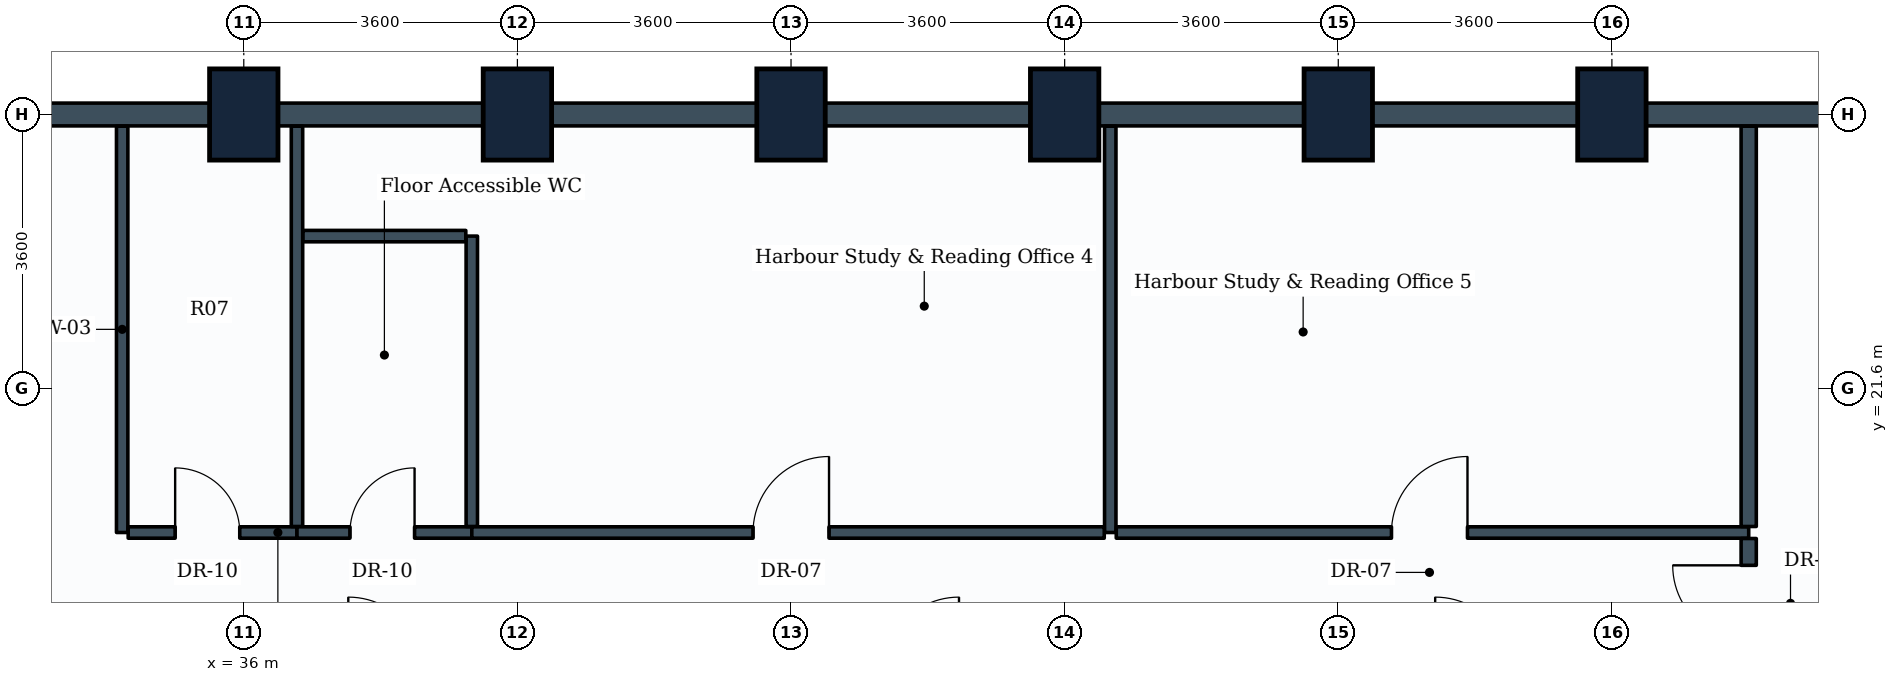
"""IFC4 building model, lengths in metres.
Left out: names, types, materials, properties, quantities, classifications, styles, units other than length and angle.
Written with IfcOpenShell. Run it as: python <this file> out.ifc"""

import sys

from ifc_helpers import new_model, si_unit, direction, frame, frame_2d, origin, origin_2d, place, context, subcontext, project, spatial, rectangle, extrude, element, fill, save


model = new_model("IFC4")
c1 = context("Model", 3, precision=1e-05, world=origin(), true_north=direction((0.0, 1.0)))
c2 = subcontext(c1, "Body", "Model", "MODEL_VIEW")
j1 = project(units=[si_unit("LENGTHUNIT", "METRE"), si_unit("PLANEANGLEUNIT", "RADIAN")], contexts=[c1])
p1 = place(None, origin())
s1 = spatial("IfcSite", under=j1, at=p1, CompositionType="ELEMENT")
p2 = place(p1, origin())
s2 = spatial("IfcBuilding", under=s1, at=p2, CompositionType="ELEMENT")
p3 = place(p2, frame((0.0, 0.0, 51.3)))
s3 = spatial("IfcBuildingStorey", under=s2, at=p3, CompositionType="ELEMENT", Elevation=51.3)
for number, where, z_axis, x_axis in (
    (1, (36.0, 25.2, 0.0), (0.0, 0.0, 1.0), (1.0, 0.0, 0.0)),
    (2, (39.6, 25.2, 0.0), (0.0, 0.0, 1.0), (1.0, 0.0, 0.0)),
    (3, (43.2, 25.2, 0.0), (0.0, 0.0, 1.0), (1.0, 0.0, 0.0)),
    (4, (46.8, 25.2, 0.0), (0.0, 0.0, 1.0), (1.0, 0.0, 0.0)),
    (5, (50.4, 25.2, 0.0), (0.0, 0.0, 1.0), (1.0, 0.0, 0.0)),
    (6, (54.0, 25.2, 0.0), (0.0, 0.0, 1.0), (1.0, 0.0, 0.0)),
):
    element("IfcColumn", number, at=place(p3, frame(where, z_axis=z_axis, x_axis=x_axis)), inside=s3, PredefinedType="COLUMN", context=c2, shape_type="SweptSolid", body=[
        extrude(rectangle(XDim=0.9, YDim=1.2, at=origin_2d()), origin(), (0.0, 0.0, 1.0), 3.9),
    ])
for number, where, z_axis, x_axis in (
    (7, (54.0, 25.2, 0.0), (0.0, 0.0, 1.0), (1.0, 0.0, 0.0)),
    (8, (50.4, 25.2, 0.0), (0.0, 0.0, 1.0), (1.0, 0.0, 0.0)),
):
    element("IfcWall", number, at=place(p3, frame(where, z_axis=z_axis, x_axis=x_axis)), inside=s3, PredefinedType="STANDARD", context=c2, shape_type="SweptSolid", body=[
        extrude(rectangle(XDim=3.6, YDim=0.3, at=frame_2d((1.8, 0.0))), origin(), (0.0, 0.0, 1.0), 2.93),
    ])
p4 = place(p3, frame((46.8, 25.2, 0.0), z_axis=(0.0, 0.0, 1.0), x_axis=(1.0, 0.0, 0.0)))
e9 = element("IfcWall", 9, at=p4, inside=s3, PredefinedType="STANDARD", context=c2, shape_type="SweptSolid", body=[
    extrude(rectangle(XDim=3.6, YDim=0.3, at=frame_2d((1.8, 0.0))), origin(), (0.0, 0.0, 1.0), 2.93),
])
p5 = place(p3, frame((43.2, 25.2, 0.0), z_axis=(0.0, 0.0, 1.0), x_axis=(1.0, 0.0, 0.0)))
e10 = element("IfcWall", 10, at=p5, inside=s3, PredefinedType="STANDARD", context=c2, shape_type="SweptSolid", body=[
    extrude(rectangle(XDim=3.6, YDim=0.3, at=frame_2d((1.8, 0.0))), origin(), (0.0, 0.0, 1.0), 2.93),
])
p6 = place(p3, frame((39.6, 25.2, 0.0), z_axis=(0.0, 0.0, 1.0), x_axis=(1.0, 0.0, 0.0)))
e11 = element("IfcWall", 11, at=p6, inside=s3, PredefinedType="STANDARD", context=c2, shape_type="SweptSolid", body=[
    extrude(rectangle(XDim=3.6, YDim=0.3, at=frame_2d((1.8, 0.0))), origin(), (0.0, 0.0, 1.0), 2.93),
])
for number, where, z_axis, x_axis in (
    (12, (36.0, 25.2, 0.0), (0.0, 0.0, 1.0), (1.0, 0.0, 0.0)),
    (13, (32.4, 25.2, 0.0), (0.0, 0.0, 1.0), (1.0, 0.0, 0.0)),
):
    element("IfcWall", number, at=place(p3, frame(where, z_axis=z_axis, x_axis=x_axis)), inside=s3, PredefinedType="STANDARD", context=c2, shape_type="SweptSolid", body=[
        extrude(rectangle(XDim=3.6, YDim=0.3, at=frame_2d((1.8, 0.0))), origin(), (0.0, 0.0, 1.0), 2.93),
    ])
p7 = place(p3, frame((34.4, 19.7, 0.0), z_axis=(0.0, 0.0, 1.0), x_axis=(0.0, 1.0, 0.0)))
e14 = element("IfcWall", 14, at=p7, inside=s3, PredefinedType="PARTITIONING", context=c2, shape_type="SweptSolid", body=[
    extrude(rectangle(XDim=5.346, YDim=0.15, at=frame_2d((2.673, 0.0))), origin(), (0.0, 0.0, 1.0), 2.93),
])
p8 = place(p3, frame((34.479, 19.7, 0.0), z_axis=(0.0, 0.0, 1.0), x_axis=(1.0, 0.0, 0.0)))
e15 = element("IfcWall", 15, at=p8, inside=s3, PredefinedType="PARTITIONING", context=c2, shape_type="SweptSolid", body=[
    extrude(rectangle(XDim=2.221, YDim=0.15, at=frame_2d((1.11, 0.0))), origin(), (0.0, 0.0, 1.0), 3.08),
])
p9 = place(p8, frame((0.618, 0.0, 0.0)))
e16 = element("IfcOpeningElement", 16, at=p9, cuts=e15, PredefinedType="OPENING", context=c2, shape_type="SweptSolid", body=[
    extrude(rectangle(XDim=0.85, YDim=2.1, at=frame_2d((0.425, 1.05))), frame((0.0, 0.085, 0.0), z_axis=(0.0, -1.0, 0.0), x_axis=(1.0, 0.0, 0.0)), (0.0, 0.0, 1.0), 0.17),
])
p10 = place(p3, frame((36.7, 19.779, 0.0), z_axis=(0.0, 0.0, 1.0), x_axis=(0.0, 1.0, 0.0)))
e17 = element("IfcWall", 17, at=p10, inside=s3, PredefinedType="PARTITIONING", context=c2, shape_type="SweptSolid", body=[
    extrude(rectangle(XDim=5.267, YDim=0.15, at=frame_2d((2.633, 0.0))), origin(), (0.0, 0.0, 1.0), 2.93),
])
p11 = place(p3, frame((36.7, 19.7, 0.0), z_axis=(0.0, 0.0, 1.0), x_axis=(1.0, 0.0, 0.0)))
e18 = element("IfcWall", 18, at=p11, inside=s3, PredefinedType="PARTITIONING", context=c2, shape_type="SweptSolid", body=[
    extrude(rectangle(XDim=2.3, YDim=0.15, at=frame_2d((1.15, 0.0))), origin(), (0.0, 0.0, 1.0), 3.635),
])
p12 = place(p11, frame((0.697, 0.0, 0.0)))
e19 = element("IfcOpeningElement", 19, at=p12, cuts=e18, PredefinedType="OPENING", context=c2, shape_type="SweptSolid", body=[
    extrude(rectangle(XDim=0.85, YDim=2.1, at=frame_2d((0.425, 1.05))), frame((0.0, 0.085, 0.0), z_axis=(0.0, -1.0, 0.0), x_axis=(1.0, 0.0, 0.0)), (0.0, 0.0, 1.0), 0.17),
])
p13 = place(p3, frame((39.0, 19.779, 0.0), z_axis=(0.0, 0.0, 1.0), x_axis=(0.0, 1.0, 0.0)))
e20 = element("IfcWall", 20, at=p13, inside=s3, PredefinedType="PARTITIONING", context=c2, shape_type="SweptSolid", body=[
    extrude(rectangle(XDim=3.821, YDim=0.15, at=frame_2d((1.911, 0.0))), origin(), (0.0, 0.0, 1.0), 3.03),
])
p14 = place(p3, frame((36.779, 23.6, 0.0), z_axis=(0.0, 0.0, 1.0), x_axis=(1.0, 0.0, 0.0)))
e21 = element("IfcWall", 21, at=p14, inside=s3, PredefinedType="PARTITIONING", context=c2, shape_type="SweptSolid", body=[
    extrude(rectangle(XDim=2.142, YDim=0.15, at=frame_2d((1.071, 0.0))), origin(), (0.0, 0.0, 1.0), 3.635),
])
p15 = place(p3, frame((47.4, 19.7, 0.0), z_axis=(0.0, 0.0, 1.0), x_axis=(0.0, 1.0, 0.0)))
e22 = element("IfcWall", 22, at=p15, inside=s3, PredefinedType="PARTITIONING", context=c2, shape_type="SweptSolid", body=[
    extrude(rectangle(XDim=5.346, YDim=0.15, at=frame_2d((2.673, 0.0))), origin(), (0.0, 0.0, 1.0), 2.93),
])
p16 = place(p3, frame((39.0, 19.7, 0.0), z_axis=(0.0, 0.0, 1.0), x_axis=(1.0, 0.0, 0.0)))
e23 = element("IfcWall", 23, at=p16, inside=s3, PredefinedType="PARTITIONING", context=c2, shape_type="SweptSolid", body=[
    extrude(rectangle(XDim=8.321, YDim=0.15, at=frame_2d((4.161, 0.0))), origin(), (0.0, 0.0, 1.0), 3.04),
])
p17 = place(p16, frame((3.7, 0.0, 0.0)))
e24 = element("IfcOpeningElement", 24, at=p17, cuts=e23, PredefinedType="OPENING", context=c2, shape_type="SweptSolid", body=[
    extrude(rectangle(XDim=1.0, YDim=2.1, at=frame_2d((0.5, 1.05))), frame((0.0, 0.085, 0.0), z_axis=(0.0, -1.0, 0.0), x_axis=(1.0, 0.0, 0.0)), (0.0, 0.0, 1.0), 0.17),
])
p18 = place(p3, frame((47.479, 19.7, 0.0), z_axis=(0.0, 0.0, 1.0), x_axis=(1.0, 0.0, 0.0)))
e25 = element("IfcWall", 25, at=p18, inside=s3, PredefinedType="PARTITIONING", context=c2, shape_type="SweptSolid", body=[
    extrude(rectangle(XDim=8.321, YDim=0.15, at=frame_2d((4.161, 0.0))), origin(), (0.0, 0.0, 1.0), 3.04),
])
p19 = place(p18, frame((3.621, 0.0, 0.0)))
e26 = element("IfcOpeningElement", 26, at=p19, cuts=e25, PredefinedType="OPENING", context=c2, shape_type="SweptSolid", body=[
    extrude(rectangle(XDim=1.0, YDim=2.1, at=frame_2d((0.5, 1.05))), frame((0.0, 0.085, 0.0), z_axis=(0.0, -1.0, 0.0), x_axis=(1.0, 0.0, 0.0)), (0.0, 0.0, 1.0), 0.17),
])
p20 = place(p3, frame((55.8, 19.779, 0.0), z_axis=(0.0, 0.0, 1.0), x_axis=(0.0, 1.0, 0.0)))
e27 = element("IfcWall", 27, at=p20, inside=s3, PredefinedType="PARTITIONING", context=c2, shape_type="SweptSolid", body=[
    extrude(rectangle(XDim=5.267, YDim=0.2, at=frame_2d((2.633, 0.0))), origin(), (0.0, 0.0, 1.0), 2.93),
])
p21 = place(p3, frame((55.8, 17.929, 0.0), z_axis=(0.0, 0.0, 1.0), x_axis=(0.0, 1.0, 0.0)))
e28 = element("IfcWall", 28, at=p21, inside=s3, PredefinedType="PARTITIONING", context=c2, shape_type="SweptSolid", body=[
    extrude(rectangle(XDim=1.692, YDim=0.2, at=frame_2d((0.846, 0.0))), origin(), (0.0, 0.0, 1.0), 3.635),
])
p22 = place(p21, frame((0.339, 0.0, 0.0)))
e29 = element("IfcOpeningElement", 29, at=p22, cuts=e28, PredefinedType="OPENING", context=c2, shape_type="SweptSolid", body=[
    extrude(rectangle(XDim=1.0, YDim=2.1, at=frame_2d((0.5, 1.05))), frame((0.0, 0.11, 0.0), z_axis=(0.0, -1.0, 0.0), x_axis=(1.0, 0.0, 0.0)), (0.0, 0.0, 1.0), 0.22),
])
p23 = place(p9, origin())
e30 = element("IfcDoor", 30, at=p23, inside=s3, OperationType="SINGLE_SWING_LEFT", PredefinedType="DOOR", context=c2, shape_type="SweptSolid", body=[
    extrude(rectangle(XDim=0.85, YDim=2.1, at=frame_2d((0.425, 1.05))), frame((0.0, 0.025, 0.0), z_axis=(0.0, -1.0, 0.0), x_axis=(1.0, 0.0, 0.0)), (0.0, 0.0, 1.0), 0.05),
])
fill(e16, e30)
p24 = place(p12, origin())
e31 = element("IfcDoor", 31, at=p24, inside=s3, OperationType="SINGLE_SWING_RIGHT", PredefinedType="DOOR", context=c2, shape_type="SweptSolid", body=[
    extrude(rectangle(XDim=0.85, YDim=2.1, at=frame_2d((0.425, 1.05))), frame((0.0, 0.025, 0.0), z_axis=(0.0, -1.0, 0.0), x_axis=(1.0, 0.0, 0.0)), (0.0, 0.0, 1.0), 0.05),
])
fill(e19, e31)
p25 = place(p17, origin())
e32 = element("IfcDoor", 32, at=p25, inside=s3, OperationType="SINGLE_SWING_RIGHT", PredefinedType="DOOR", context=c2, shape_type="SweptSolid", body=[
    extrude(rectangle(XDim=1.0, YDim=2.1, at=frame_2d((0.5, 1.05))), frame((0.0, 0.025, 0.0), z_axis=(0.0, -1.0, 0.0), x_axis=(1.0, 0.0, 0.0)), (0.0, 0.0, 1.0), 0.05),
])
fill(e24, e32)
p26 = place(p19, origin())
e33 = element("IfcDoor", 33, at=p26, inside=s3, OperationType="SINGLE_SWING_RIGHT", PredefinedType="DOOR", context=c2, shape_type="SweptSolid", body=[
    extrude(rectangle(XDim=1.0, YDim=2.1, at=frame_2d((0.5, 1.05))), frame((0.0, 0.025, 0.0), z_axis=(0.0, -1.0, 0.0), x_axis=(1.0, 0.0, 0.0)), (0.0, 0.0, 1.0), 0.05),
])
fill(e26, e33)
p27 = place(p22, origin())
e34 = element("IfcDoor", 34, at=p27, inside=s3, OperationType="SINGLE_SWING_RIGHT", PredefinedType="DOOR", context=c2, shape_type="SweptSolid", body=[
    extrude(rectangle(XDim=1.0, YDim=2.1, at=frame_2d((0.5, 1.05))), frame((0.0, 0.025, 0.0), z_axis=(0.0, -1.0, 0.0), x_axis=(1.0, 0.0, 0.0)), (0.0, 0.0, 1.0), 0.05),
])
fill(e29, e34)
save(model, sys.argv[1])
